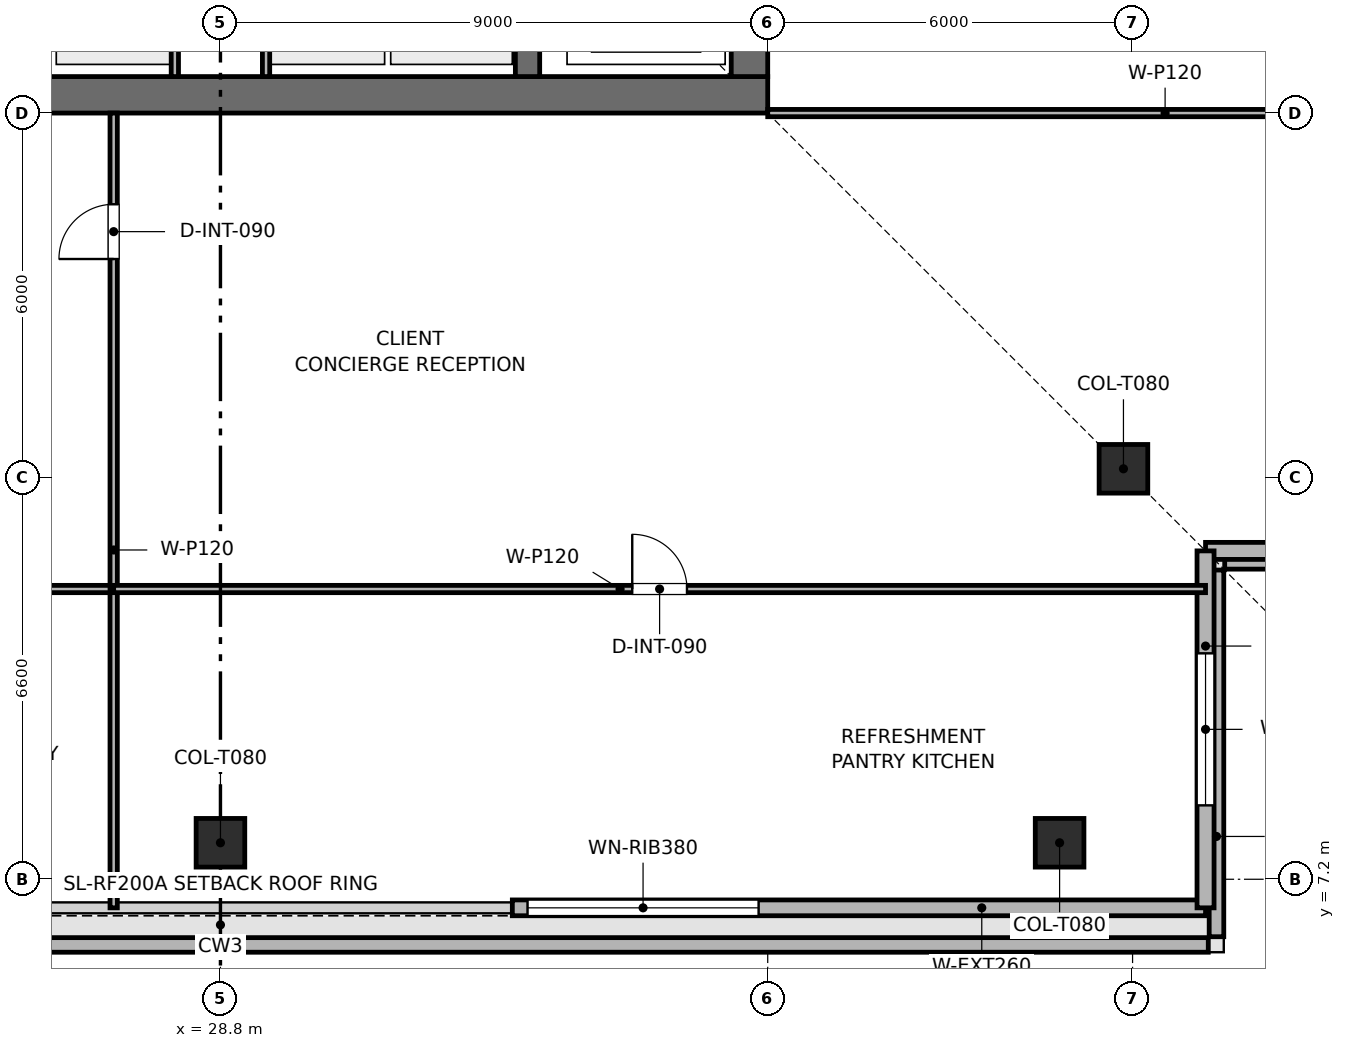
"""IFC4 building model, lengths in metres.
Left out: names, types, materials, properties, quantities, classifications, styles, units other than length and angle.
Written with IfcOpenShell. Run it as: python <this file> out.ifc"""

import sys

from ifc_helpers import new_model, si_unit, direction, frame, frame_2d, origin, origin_2d, place, context, subcontext, project, spatial, rectangle, extrude, element, fill, save


model = new_model("IFC4")
c1 = context("Model", 3, precision=1e-05, world=origin(), true_north=direction((0.0, 1.0)))
c2 = subcontext(c1, "Body", "Model", "MODEL_VIEW")
j1 = project(units=[si_unit("LENGTHUNIT", "METRE"), si_unit("PLANEANGLEUNIT", "RADIAN")], contexts=[c1])
p1 = place(None, origin())
s1 = spatial("IfcSite", under=j1, at=p1, CompositionType="ELEMENT")
p2 = place(p1, origin())
s2 = spatial("IfcBuilding", under=s1, at=p2, CompositionType="ELEMENT")
p3 = place(p2, frame((0.0, 0.0, 333.0)))
s3 = spatial("IfcBuildingStorey", under=s2, at=p3, CompositionType="ELEMENT", Elevation=333.0)
p4 = place(p3, frame((19.8, 20.1, 0.0), z_axis=(0.0, 0.0, 1.0), x_axis=(1.0, 0.0, 0.0)))
e1 = element("IfcWall", 1, at=p4, inside=s3, PredefinedType="SHEAR", context=c2, shape_type="SweptSolid", body=[
    extrude(rectangle(XDim=18.0, YDim=0.6, at=frame_2d((9.0, 0.0))), origin(), (0.0, 0.0, 1.0), 3.75),
])
p5 = place(p3, frame((37.5, 20.4, 0.0), z_axis=(0.0, 0.0, 1.0), x_axis=(0.0, 1.0, 0.0)))
e2 = element("IfcWall", 2, at=p5, inside=s3, PredefinedType="SHEAR", context=c2, shape_type="SweptSolid", body=[
    extrude(rectangle(XDim=16.8, YDim=0.6, at=frame_2d((8.4, 0.0))), origin(), (0.0, 0.0, 1.0), 3.75),
])
p6 = place(p5, frame((4.9, 0.0, 0.0)))
e3 = element("IfcOpeningElement", 3, at=p6, cuts=e2, PredefinedType="OPENING", context=c2, shape_type="SweptSolid", body=[
    extrude(rectangle(XDim=1.1, YDim=2.15, at=frame_2d((0.55, 1.075))), frame((0.0, 0.31, 0.0), z_axis=(0.0, -1.0, 0.0), x_axis=(1.0, 0.0, 0.0)), (0.0, 0.0, 1.0), 0.62),
])
p7 = place(p3, frame((33.85, 20.4, 0.0), z_axis=(0.0, 0.0, 1.0), x_axis=(0.0, 1.0, 0.0)))
e4 = element("IfcWall", 4, at=p7, inside=s3, PredefinedType="SHEAR", context=c2, shape_type="SweptSolid", body=[
    extrude(rectangle(XDim=16.8, YDim=0.4, at=frame_2d((8.4, 0.0))), origin(), (0.0, 0.0, 1.0), 3.75),
])
for number, where, z_axis, x_axis in (
    (5, (28.8, 7.8, 0.003), (0.0, 0.0, 1.0), (1.0, 0.0, 0.0)),
    (6, (42.6, 7.8, 0.003), (0.0, 0.0, 1.0), (1.0, 0.0, 0.0)),
    (7, (43.65, 13.95, 0.003), (0.0, 0.0, 1.0), (1.0, 0.0, 0.0)),
):
    element("IfcColumn", number, at=place(p3, frame(where, z_axis=z_axis, x_axis=x_axis)), inside=s3, PredefinedType="COLUMN", context=c2, shape_type="SweptSolid", body=[
        extrude(rectangle(XDim=0.8, YDim=0.8, at=origin_2d()), origin(), (0.0, 0.0, 1.0), 3.504),
    ])
p8 = place(p3, frame((12.555, 6.12, 0.0), z_axis=(0.0, 0.0, 1.0), x_axis=(1.0, 0.0, 0.0)))
e8 = element("IfcWall", 8, at=p8, inside=s3, PredefinedType="PARAPET", context=c2, shape_type="SweptSolid", body=[
    extrude(rectangle(XDim=32.49, YDim=0.24, at=frame_2d((16.245, 0.0))), origin(), (0.0, 0.0, 1.0), 1.2),
])
for number, where, z_axis, x_axis in (
    (9, (45.18, 6.255, 0.0), (0.0, 0.0, 1.0), (0.0, 1.0, 0.0)),
    (10, (45.315, 12.42, 0.0), (0.0, 0.0, 1.0), (1.0, 0.0, 0.0)),
):
    element("IfcWall", number, at=place(p3, frame(where, z_axis=z_axis, x_axis=x_axis)), inside=s3, PredefinedType="PARAPET", context=c2, shape_type="SweptSolid", body=[
        extrude(rectangle(XDim=6.03, YDim=0.24, at=frame_2d((3.015, 0.0))), origin(), (0.0, 0.0, 1.0), 1.2),
    ])
p9 = place(p3, frame((45.0, 6.73, 0.0), z_axis=(0.0, 0.0, 1.0), x_axis=(-1.0, 0.0, 0.0)))
e11 = element("IfcWall", 11, at=p9, inside=s3, PredefinedType="SOLIDWALL", context=c2, shape_type="SweptSolid", body=[
    extrude(rectangle(XDim=11.4, YDim=0.26, at=frame_2d((5.7, 0.0))), origin(), (0.0, 0.0, 1.0), 3.51),
])
p10 = place(p9, frame((7.35, 0.0, 0.9)))
e12 = element("IfcOpeningElement", 12, at=p10, cuts=e11, PredefinedType="OPENING", context=c2, shape_type="SweptSolid", body=[
    extrude(rectangle(XDim=3.8, YDim=1.9, at=frame_2d((1.9, 0.95))), frame((0.0, 0.14, 0.0), z_axis=(0.0, -1.0, 0.0), x_axis=(1.0, 0.0, 0.0)), (0.0, 0.0, 1.0), 0.28),
])
p11 = place(p3, frame((50.87, 12.6, 0.0), z_axis=(0.0, 0.0, 1.0), x_axis=(-1.0, 0.0, 0.0)))
e13 = element("IfcWall", 13, at=p11, inside=s3, PredefinedType="SOLIDWALL", context=c2, shape_type="SweptSolid", body=[
    extrude(rectangle(XDim=5.87, YDim=0.28, at=frame_2d((2.935, 0.0))), origin(), (0.0, 0.0, 1.0), 3.51),
])
p12 = place(p11, frame((1.685, 0.0, 0.9)))
e14 = element("IfcOpeningElement", 14, at=p12, cuts=e13, PredefinedType="OPENING", context=c2, shape_type="SweptSolid", body=[
    extrude(rectangle(XDim=2.5, YDim=1.9, at=frame_2d((1.25, 0.95))), frame((0.0, 0.15, 0.0), z_axis=(0.0, -1.0, 0.0), x_axis=(1.0, 0.0, 0.0)), (0.0, 0.0, 1.0), 0.3),
])
p13 = place(p3, frame((45.0, 12.6, 0.0), z_axis=(0.0, 0.0, 1.0), x_axis=(0.0, -1.0, 0.0)))
e15 = element("IfcWall", 15, at=p13, inside=s3, PredefinedType="SOLIDWALL", context=c2, shape_type="SweptSolid", body=[
    extrude(rectangle(XDim=5.87, YDim=0.28, at=frame_2d((2.935, 0.0))), origin(), (0.0, 0.0, 1.0), 3.51),
])
p14 = place(p13, frame((1.685, 0.0, 0.9)))
e16 = element("IfcOpeningElement", 16, at=p14, cuts=e15, PredefinedType="OPENING", context=c2, shape_type="SweptSolid", body=[
    extrude(rectangle(XDim=2.5, YDim=1.9, at=frame_2d((1.25, 0.95))), frame((0.0, 0.15, 0.0), z_axis=(0.0, -1.0, 0.0), x_axis=(1.0, 0.0, 0.0)), (0.0, 0.0, 1.0), 0.3),
])
for number, where, z_axis, x_axis in (
    (17, (28.05, 20.4, 0.0), (0.0, 0.0, 1.0), (0.0, 1.0, 0.0)),
    (18, (29.55, 20.4, 0.0), (0.0, 0.0, 1.0), (0.0, 1.0, 0.0)),
):
    element("IfcWall", number, at=place(p3, frame(where, z_axis=z_axis, x_axis=x_axis)), inside=s3, PredefinedType="PARTITIONING", context=c2, shape_type="SweptSolid", body=[
        extrude(rectangle(XDim=2.75, YDim=0.12, at=frame_2d((1.375, 0.0))), origin(), (0.0, 0.0, 1.0), 3.51),
    ])
p15 = place(p3, frame((19.8, 11.973, 0.0), z_axis=(0.0, 0.0, 1.0), x_axis=(1.0, 0.0, 0.0)))
e19 = element("IfcWall", 19, at=p15, inside=s3, PredefinedType="PARTITIONING", context=c2, shape_type="SweptSolid", body=[
    extrude(rectangle(XDim=7.244, YDim=0.12, at=frame_2d((3.622, 0.0))), origin(), (0.0, 0.0, 1.0), 3.095),
])
p16 = place(p15, frame((1.686, 0.0, 0.0)))
e20 = element("IfcOpeningElement", 20, at=p16, cuts=e19, PredefinedType="OPENING", context=c2, shape_type="SweptSolid", body=[
    extrude(rectangle(XDim=0.9, YDim=2.1, at=frame_2d((0.45, 1.05))), frame((0.0, 0.07, 0.0), z_axis=(0.0, -1.0, 0.0), x_axis=(1.0, 0.0, 0.0)), (0.0, 0.0, 1.0), 0.14),
])
p17 = place(p3, frame((27.044, 6.73, 0.0), z_axis=(0.0, 0.0, 1.0), x_axis=(0.0, 1.0, 0.0)))
e21 = element("IfcWall", 21, at=p17, inside=s3, PredefinedType="PARTITIONING", context=c2, shape_type="SweptSolid", body=[
    extrude(rectangle(XDim=13.07, YDim=0.12, at=frame_2d((6.535, 0.0))), origin(), (0.0, 0.0, 1.0), 3.135),
])
p18 = place(p17, frame((10.67, 0.0, 0.0)))
e22 = element("IfcOpeningElement", 22, at=p18, cuts=e21, PredefinedType="OPENING", context=c2, shape_type="SweptSolid", body=[
    extrude(rectangle(XDim=0.9, YDim=2.1, at=frame_2d((0.45, 1.05))), frame((0.0, 0.07, 0.0), z_axis=(0.0, -1.0, 0.0), x_axis=(1.0, 0.0, 0.0)), (0.0, 0.0, 1.0), 0.14),
])
p19 = place(p3, frame((27.044, 11.973, 0.0), z_axis=(0.0, 0.0, 1.0), x_axis=(1.0, 0.0, 0.0)))
e23 = element("IfcWall", 23, at=p19, inside=s3, PredefinedType="PARTITIONING", context=c2, shape_type="SweptSolid", body=[
    extrude(rectangle(XDim=17.956, YDim=0.12, at=frame_2d((8.978, 0.0))), origin(), (0.0, 0.0, 1.0), 3.095),
])
p20 = place(p19, frame((8.528, 0.0, 0.0)))
e24 = element("IfcOpeningElement", 24, at=p20, cuts=e23, PredefinedType="OPENING", context=c2, shape_type="SweptSolid", body=[
    extrude(rectangle(XDim=0.9, YDim=2.1, at=frame_2d((0.45, 1.05))), frame((0.0, 0.07, 0.0), z_axis=(0.0, -1.0, 0.0), x_axis=(1.0, 0.0, 0.0)), (0.0, 0.0, 1.0), 0.14),
])
p21 = place(p3, frame((37.8, 19.8, 0.0), z_axis=(0.0, 0.0, 1.0), x_axis=(1.0, 0.0, 0.0)))
e25 = element("IfcWall", 25, at=p21, inside=s3, PredefinedType="PARTITIONING", context=c2, shape_type="SweptSolid", body=[
    extrude(rectangle(XDim=13.07, YDim=0.12, at=frame_2d((6.535, 0.0))), origin(), (0.0, 0.0, 1.0), 3.095),
])
p22 = place(p10, origin())
e26 = element("IfcWindow", 26, at=p22, inside=s3, PartitioningType="SINGLE_PANEL", PredefinedType="WINDOW", context=c2, shape_type="SweptSolid", body=[
    extrude(rectangle(XDim=3.8, YDim=1.9, at=frame_2d((1.9, 0.95))), frame((0.0, 0.03, 0.0), z_axis=(0.0, -1.0, 0.0), x_axis=(1.0, 0.0, 0.0)), (0.0, 0.0, 1.0), 0.06),
])
fill(e12, e26)
p23 = place(p14, origin())
e27 = element("IfcWindow", 27, at=p23, inside=s3, PartitioningType="SINGLE_PANEL", PredefinedType="WINDOW", context=c2, shape_type="SweptSolid", body=[
    extrude(rectangle(XDim=2.5, YDim=1.9, at=frame_2d((1.25, 0.95))), frame((0.0, 0.03, 0.0), z_axis=(0.0, -1.0, 0.0), x_axis=(1.0, 0.0, 0.0)), (0.0, 0.0, 1.0), 0.06),
])
fill(e16, e27)
p24 = place(p18, origin())
e28 = element("IfcDoor", 28, at=p24, inside=s3, OperationType="SINGLE_SWING_LEFT", PredefinedType="DOOR", context=c2, shape_type="SweptSolid", body=[
    extrude(rectangle(XDim=0.9, YDim=2.1, at=frame_2d((0.45, 1.05))), frame((0.0, 0.025, 0.0), z_axis=(0.0, -1.0, 0.0), x_axis=(1.0, 0.0, 0.0)), (0.0, 0.0, 1.0), 0.05),
])
fill(e22, e28)
p25 = place(p20, origin())
e29 = element("IfcDoor", 29, at=p25, inside=s3, OperationType="SINGLE_SWING_LEFT", PredefinedType="DOOR", context=c2, shape_type="SweptSolid", body=[
    extrude(rectangle(XDim=0.9, YDim=2.1, at=frame_2d((0.45, 1.05))), frame((0.0, 0.025, 0.0), z_axis=(0.0, -1.0, 0.0), x_axis=(1.0, 0.0, 0.0)), (0.0, 0.0, 1.0), 0.05),
])
fill(e24, e29)
save(model, sys.argv[1])
